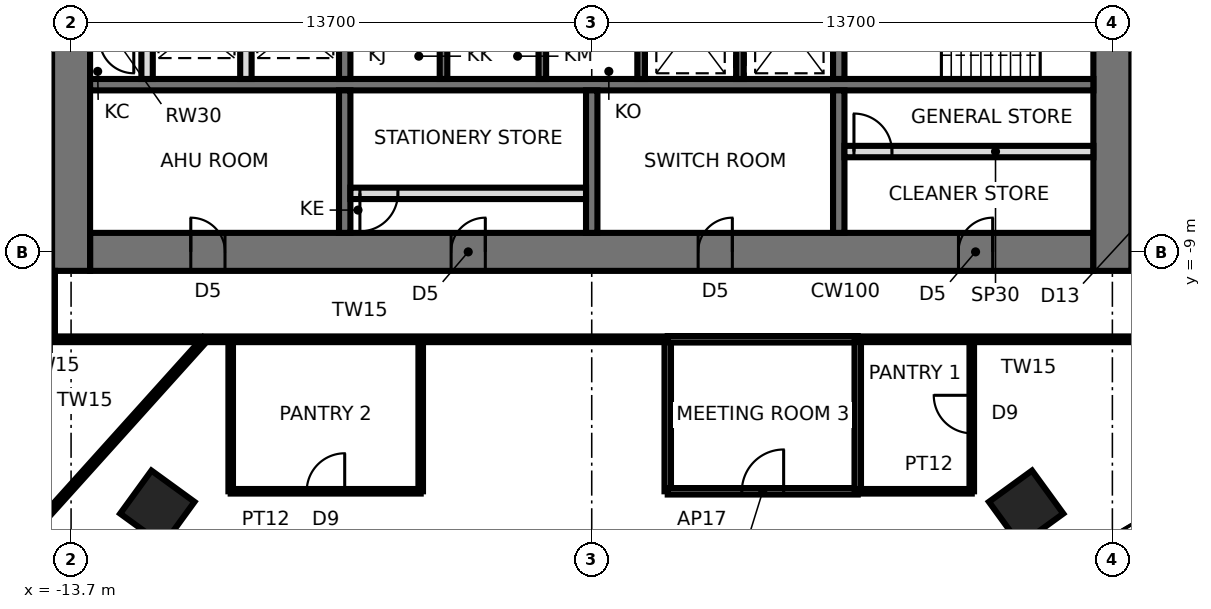
"""IFC4 building model, lengths in metres.
Left out: names, types, materials, properties, quantities, classifications, styles, units other than length and angle.
Written with IfcOpenShell. Run it as: python <this file> out.ifc"""

import sys

from ifc_helpers import new_model, si_unit, direction, frame, frame_2d, origin, origin_2d, place, context, subcontext, project, spatial, rectangle, extrude, element, fill, save


model = new_model("IFC4")
c1 = context("Model", 3, precision=1e-05, world=origin(), true_north=direction((0.0, 1.0)))
c2 = subcontext(c1, "Body", "Model", "MODEL_VIEW")
j1 = project(units=[si_unit("LENGTHUNIT", "METRE"), si_unit("PLANEANGLEUNIT", "RADIAN")], contexts=[c1])
p1 = place(None, origin())
s1 = spatial("IfcSite", under=j1, at=p1, CompositionType="ELEMENT")
p2 = place(p1, origin())
s2 = spatial("IfcBuilding", under=s1, at=p2, CompositionType="ELEMENT")
p3 = place(p2, frame((0.0, 0.0, 211.1)))
s3 = spatial("IfcBuildingStorey", under=s2, at=p3, CompositionType="ELEMENT", Elevation=211.1)
for number, where, z_axis, x_axis in (
    (1, (-11.43, -15.733, 0.0), (0.0, 0.0, 1.0), (-0.588, -0.809, 0.0)),
    (2, (11.43, -15.733, 0.0), (0.0, 0.0, 1.0), (0.588, -0.809, 0.0)),
):
    element("IfcColumn", number, at=place(p3, frame(where, z_axis=z_axis, x_axis=x_axis)), inside=s3, PredefinedType="COLUMN", context=c2, shape_type="SweptSolid", body=[
        extrude(rectangle(XDim=1.4, YDim=1.4, at=origin_2d()), origin(), (0.0, 0.0, 1.0), 3.9),
    ])
p4 = place(p3, frame((-13.2, -9.0, 0.0), z_axis=(0.0, 0.0, 1.0), x_axis=(1.0, 0.0, 0.0)))
e3 = element("IfcWall", 3, at=p4, inside=s3, PredefinedType="SHEAR", context=c2, shape_type="SweptSolid", body=[
    extrude(rectangle(XDim=26.4, YDim=1.0, at=frame_2d((13.2, 0.0))), origin(), (0.0, 0.0, 1.0), 3.9),
])
p5 = place(p4, frame((2.65, 0.0, 0.0)))
e4 = element("IfcOpeningElement", 4, at=p5, cuts=e3, PredefinedType="OPENING", context=c2, shape_type="SweptSolid", body=[
    extrude(rectangle(XDim=0.9, YDim=2.1, at=frame_2d((0.45, 1.05))), frame((0.0, 0.51, 0.0), z_axis=(0.0, -1.0, 0.0), x_axis=(1.0, 0.0, 0.0)), (0.0, 0.0, 1.0), 1.02),
])
p6 = place(p4, frame((9.5, 0.0, 0.0)))
e5 = element("IfcOpeningElement", 5, at=p6, cuts=e3, PredefinedType="OPENING", context=c2, shape_type="SweptSolid", body=[
    extrude(rectangle(XDim=0.9, YDim=2.1, at=frame_2d((0.45, 1.05))), frame((0.0, 0.51, 0.0), z_axis=(0.0, -1.0, 0.0), x_axis=(1.0, 0.0, 0.0)), (0.0, 0.0, 1.0), 1.02),
])
p7 = place(p4, frame((16.0, 0.0, 0.0)))
e6 = element("IfcOpeningElement", 6, at=p7, cuts=e3, PredefinedType="OPENING", context=c2, shape_type="SweptSolid", body=[
    extrude(rectangle(XDim=0.9, YDim=2.1, at=frame_2d((0.45, 1.05))), frame((0.0, 0.51, 0.0), z_axis=(0.0, -1.0, 0.0), x_axis=(1.0, 0.0, 0.0)), (0.0, 0.0, 1.0), 1.02),
])
p8 = place(p4, frame((22.85, 0.0, 0.0)))
e7 = element("IfcOpeningElement", 7, at=p8, cuts=e3, PredefinedType="OPENING", context=c2, shape_type="SweptSolid", body=[
    extrude(rectangle(XDim=0.9, YDim=2.1, at=frame_2d((0.45, 1.05))), frame((0.0, 0.51, 0.0), z_axis=(0.0, -1.0, 0.0), x_axis=(1.0, 0.0, 0.0)), (0.0, 0.0, 1.0), 1.02),
])
p9 = place(p3, frame((13.7, -9.5, 0.0), z_axis=(0.0, 0.0, 1.0), x_axis=(0.0, 1.0, 0.0)))
e8 = element("IfcWall", 8, at=p9, inside=s3, PredefinedType="SHEAR", context=c2, shape_type="SweptSolid", body=[
    extrude(rectangle(XDim=19.0, YDim=1.0, at=frame_2d((9.5, 0.0))), origin(), (0.0, 0.0, 1.0), 3.9),
])
p10 = place(p9, frame((8.6, 0.0, 0.0)))
e9 = element("IfcOpeningElement", 9, at=p10, cuts=e8, PredefinedType="OPENING", context=c2, shape_type="SweptSolid", body=[
    extrude(rectangle(XDim=1.8, YDim=2.4, at=frame_2d((0.9, 1.2))), frame((0.0, 0.51, 0.0), z_axis=(0.0, -1.0, 0.0), x_axis=(1.0, 0.0, 0.0)), (0.0, 0.0, 1.0), 1.02),
])
p11 = place(p3, frame((-13.7, 9.5, 0.0), z_axis=(0.0, 0.0, 1.0), x_axis=(0.0, -1.0, 0.0)))
e10 = element("IfcWall", 10, at=p11, inside=s3, PredefinedType="SHEAR", context=c2, shape_type="SweptSolid", body=[
    extrude(rectangle(XDim=19.0, YDim=1.0, at=frame_2d((9.5, 0.0))), origin(), (0.0, 0.0, 1.0), 3.9),
])
p12 = place(p11, frame((8.6, 0.0, 0.0)))
e11 = element("IfcOpeningElement", 11, at=p12, cuts=e10, PredefinedType="OPENING", context=c2, shape_type="SweptSolid", body=[
    extrude(rectangle(XDim=1.8, YDim=2.4, at=frame_2d((0.9, 1.2))), frame((0.0, 0.51, 0.0), z_axis=(0.0, -1.0, 0.0), x_axis=(1.0, 0.0, 0.0)), (0.0, 0.0, 1.0), 1.02),
])
p13 = place(p3, frame((-13.2, -4.6, 0.0), z_axis=(0.0, 0.0, 1.0), x_axis=(1.0, 0.0, 0.0)))
e12 = element("IfcWall", 12, at=p13, inside=s3, PredefinedType="SHEAR", context=c2, shape_type="SweptSolid", body=[
    extrude(rectangle(XDim=26.4, YDim=0.3, at=frame_2d((13.2, 0.0))), origin(), (0.0, 0.0, 1.0), 3.9),
])
p14 = place(p3, frame((-6.5, -1.75, 0.0), z_axis=(0.0, 0.0, 1.0), x_axis=(0.0, -1.0, 0.0)))
e13 = element("IfcWall", 13, at=p14, inside=s3, PredefinedType="SHEAR", context=c2, shape_type="SweptSolid", body=[
    extrude(rectangle(XDim=2.7, YDim=0.3, at=frame_2d((1.35, 0.0))), origin(), (0.0, 0.0, 1.0), 3.9),
])
p15 = place(p3, frame((-6.5, -4.75, 0.0), z_axis=(0.0, 0.0, 1.0), x_axis=(0.0, -1.0, 0.0)))
e14 = element("IfcWall", 14, at=p15, inside=s3, PredefinedType="SHEAR", context=c2, shape_type="SweptSolid", body=[
    extrude(rectangle(XDim=3.75, YDim=0.3, at=frame_2d((1.875, 0.0))), origin(), (0.0, 0.0, 1.0), 3.9),
])
p16 = place(p3, frame((6.5, -1.75, 0.0), z_axis=(0.0, 0.0, 1.0), x_axis=(0.0, -1.0, 0.0)))
e15 = element("IfcWall", 15, at=p16, inside=s3, PredefinedType="SHEAR", context=c2, shape_type="SweptSolid", body=[
    extrude(rectangle(XDim=2.7, YDim=0.3, at=frame_2d((1.35, 0.0))), origin(), (0.0, 0.0, 1.0), 3.9),
])
p17 = place(p3, frame((6.5, -4.75, 0.0), z_axis=(0.0, 0.0, 1.0), x_axis=(0.0, -1.0, 0.0)))
e16 = element("IfcWall", 16, at=p17, inside=s3, PredefinedType="SHEAR", context=c2, shape_type="SweptSolid", body=[
    extrude(rectangle(XDim=3.75, YDim=0.3, at=frame_2d((1.875, 0.0))), origin(), (0.0, 0.0, 1.0), 3.9),
])
for number, where, z_axis, x_axis in (
    (17, (-3.9, -1.75, 0.0), (0.0, 0.0, 1.0), (0.0, -1.0, 0.0)),
    (18, (-1.3, -1.75, 0.0), (0.0, 0.0, 1.0), (0.0, -1.0, 0.0)),
    (19, (1.3, -1.75, 0.0), (0.0, 0.0, 1.0), (0.0, -1.0, 0.0)),
    (20, (3.9, -1.75, 0.0), (0.0, 0.0, 1.0), (0.0, -1.0, 0.0)),
):
    element("IfcWall", number, at=place(p3, frame(where, z_axis=z_axis, x_axis=x_axis)), inside=s3, PredefinedType="SHEAR", context=c2, shape_type="SweptSolid", body=[
        extrude(rectangle(XDim=2.7, YDim=0.2, at=frame_2d((1.35, 0.0))), origin(), (0.0, 0.0, 1.0), 3.9),
    ])
p18 = place(p3, frame((0.0, -4.75, 0.0), z_axis=(0.0, 0.0, 1.0), x_axis=(0.0, -1.0, 0.0)))
e21 = element("IfcWall", 21, at=p18, inside=s3, PredefinedType="SHEAR", context=c2, shape_type="SweptSolid", body=[
    extrude(rectangle(XDim=3.75, YDim=0.3, at=frame_2d((1.875, 0.0))), origin(), (0.0, 0.0, 1.0), 3.9),
])
p19 = place(p3, frame((-6.35, -7.46, 0.0), z_axis=(0.0, 0.0, 1.0), x_axis=(1.0, 0.0, 0.0)))
e22 = element("IfcWall", 22, at=p19, inside=s3, PredefinedType="PARTITIONING", context=c2, shape_type="SweptSolid", body=[
    extrude(rectangle(XDim=6.2, YDim=0.3, at=frame_2d((3.1, 0.0))), origin(), (0.0, 0.0, 1.0), 3.74),
])
p20 = place(p19, frame((0.25, 0.0, 0.0)))
e23 = element("IfcOpeningElement", 23, at=p20, cuts=e22, PredefinedType="OPENING", context=c2, shape_type="SweptSolid", body=[
    extrude(rectangle(XDim=1.0, YDim=2.4, at=frame_2d((0.5, 1.2))), frame((0.0, 0.16, 0.0), z_axis=(0.0, -1.0, 0.0), x_axis=(1.0, 0.0, 0.0)), (0.0, 0.0, 1.0), 0.32),
])
p21 = place(p3, frame((6.65, -6.36, 0.0), z_axis=(0.0, 0.0, 1.0), x_axis=(1.0, 0.0, 0.0)))
e24 = element("IfcWall", 24, at=p21, inside=s3, PredefinedType="PARTITIONING", context=c2, shape_type="SweptSolid", body=[
    extrude(rectangle(XDim=6.55, YDim=0.3, at=frame_2d((3.275, 0.0))), origin(), (0.0, 0.0, 1.0), 3.74),
])
p22 = place(p21, frame((0.25, 0.0, 0.0)))
e25 = element("IfcOpeningElement", 25, at=p22, cuts=e24, PredefinedType="OPENING", context=c2, shape_type="SweptSolid", body=[
    extrude(rectangle(XDim=1.0, YDim=2.4, at=frame_2d((0.5, 1.2))), frame((0.0, 0.16, 0.0), z_axis=(0.0, -1.0, 0.0), x_axis=(1.0, 0.0, 0.0)), (0.0, 0.0, 1.0), 0.32),
])
for number, where, z_axis, x_axis in (
    (26, (-9.1, -1.75, 0.0), (0.0, 0.0, 1.0), (0.0, -1.0, 0.0)),
    (27, (-11.7, -1.75, 0.0), (0.0, 0.0, 1.0), (0.0, -1.0, 0.0)),
):
    element("IfcWall", number, at=place(p3, frame(where, z_axis=z_axis, x_axis=x_axis)), inside=s3, PredefinedType="SOLIDWALL", context=c2, shape_type="SweptSolid", body=[
        extrude(rectangle(XDim=2.7, YDim=0.3, at=frame_2d((1.35, 0.0))), origin(), (0.0, 0.0, 1.0), 3.74),
    ])
p23 = place(p3, frame((-14.2, -9.5, 0.0), z_axis=(0.0, 0.0, 1.0), x_axis=(0.0, -1.0, 0.0)))
e28 = element("IfcWall", 28, at=p23, inside=s3, PredefinedType="PARTITIONING", context=c2, shape_type="SweptSolid", body=[
    extrude(rectangle(XDim=1.8, YDim=0.15, at=frame_2d((0.9, 0.0))), origin(), (0.0, 0.0, 1.0), 3.74),
])
p24 = place(p3, frame((-14.627, -16.245, 0.0), z_axis=(0.0, 0.0, 1.0), x_axis=(0.669116748293, 0.743157303102, 0.0)))
e29 = element("IfcWall", 29, at=p24, inside=s3, PredefinedType="PARTITIONING", context=c2, shape_type="SweptSolid", body=[
    extrude(rectangle(XDim=6.654, YDim=0.15, at=frame_2d((3.327, 0.0))), origin(), (0.0, 0.0, 1.0), 3.74),
])
p25 = place(p3, frame((-9.5, -11.3, 0.0), z_axis=(0.0, 0.0, 1.0), x_axis=(0.0, -1.0, 0.0)))
e30 = element("IfcWall", 30, at=p25, inside=s3, PredefinedType="PARTITIONING", context=c2, shape_type="SweptSolid", body=[
    extrude(rectangle(XDim=4.0, YDim=0.12, at=frame_2d((2.0, 0.0))), origin(), (0.0, 0.0, 1.0), 3.74),
])
p26 = place(p3, frame((-14.2, -11.3, 0.0), z_axis=(0.0, 0.0, 1.0), x_axis=(1.0, 0.0, 0.0)))
e31 = element("IfcWall", 31, at=p26, inside=s3, PredefinedType="PARTITIONING", context=c2, shape_type="SweptSolid", body=[
    extrude(rectangle(XDim=16.2, YDim=0.15, at=frame_2d((8.1, 0.0))), origin(), (0.0, 0.0, 1.0), 3.74),
])
p27 = place(p3, frame((-9.5, -15.3, 0.0), z_axis=(0.0, 0.0, 1.0), x_axis=(1.0, 0.0, 0.0)))
e32 = element("IfcWall", 32, at=p27, inside=s3, PredefinedType="PARTITIONING", context=c2, shape_type="SweptSolid", body=[
    extrude(rectangle(XDim=5.0, YDim=0.12, at=frame_2d((2.5, 0.0))), origin(), (0.0, 0.0, 1.0), 3.334),
])
p28 = place(p27, frame((2.0, 0.0, 0.0)))
e33 = element("IfcOpeningElement", 33, at=p28, cuts=e32, PredefinedType="OPENING", context=c2, shape_type="SweptSolid", body=[
    extrude(rectangle(XDim=1.0, YDim=2.4, at=frame_2d((0.5, 1.2))), frame((0.0, 0.07, 0.0), z_axis=(0.0, -1.0, 0.0), x_axis=(1.0, 0.0, 0.0)), (0.0, 0.0, 1.0), 0.14),
])
p29 = place(p3, frame((-4.5, -15.3, 0.0), z_axis=(0.0, 0.0, 1.0), x_axis=(0.0, 1.0, 0.0)))
e34 = element("IfcWall", 34, at=p29, inside=s3, PredefinedType="PARTITIONING", context=c2, shape_type="SweptSolid", body=[
    extrude(rectangle(XDim=4.0, YDim=0.12, at=frame_2d((2.0, 0.0))), origin(), (0.0, 0.0, 1.0), 3.74),
])
p30 = place(p3, frame((2.0, -11.3, 0.0), z_axis=(0.0, 0.0, 1.0), x_axis=(0.0, -1.0, 0.0)))
e35 = element("IfcWall", 35, at=p30, inside=s3, PredefinedType="PARTITIONING", context=c2, shape_type="SweptSolid", body=[
    extrude(rectangle(XDim=4.0, YDim=0.17, at=frame_2d((2.0, 0.0))), origin(), (0.0, 0.0, 1.0), 3.74),
])
p31 = place(p3, frame((2.0, -15.3, 0.0), z_axis=(0.0, 0.0, 1.0), x_axis=(1.0, 0.0, 0.0)))
e36 = element("IfcWall", 36, at=p31, inside=s3, PredefinedType="PARTITIONING", context=c2, shape_type="SweptSolid", body=[
    extrude(rectangle(XDim=5.0, YDim=0.17, at=frame_2d((2.5, 0.0))), origin(), (0.0, 0.0, 1.0), 3.334),
])
p32 = place(p31, frame((1.95, 0.0, 0.0)))
e37 = element("IfcOpeningElement", 37, at=p32, cuts=e36, PredefinedType="OPENING", context=c2, shape_type="SweptSolid", body=[
    extrude(rectangle(XDim=1.1, YDim=2.4, at=frame_2d((0.55, 1.2))), frame((0.0, 0.095, 0.0), z_axis=(0.0, -1.0, 0.0), x_axis=(1.0, 0.0, 0.0)), (0.0, 0.0, 1.0), 0.19),
])
p33 = place(p3, frame((7.0, -11.3, 0.0), z_axis=(0.0, 0.0, 1.0), x_axis=(-1.0, 0.0, 0.0)))
e38 = element("IfcWall", 38, at=p33, inside=s3, PredefinedType="PARTITIONING", context=c2, shape_type="SweptSolid", body=[
    extrude(rectangle(XDim=5.0, YDim=0.17, at=frame_2d((2.5, 0.0))), origin(), (0.0, 0.0, 1.0), 3.74),
])
p34 = place(p3, frame((7.0, -11.3, 0.0), z_axis=(0.0, 0.0, 1.0), x_axis=(0.0, -1.0, 0.0)))
e39 = element("IfcWall", 39, at=p34, inside=s3, PredefinedType="PARTITIONING", context=c2, shape_type="SweptSolid", body=[
    extrude(rectangle(XDim=4.0, YDim=0.17, at=frame_2d((2.0, 0.0))), origin(), (0.0, 0.0, 1.0), 3.74),
])
p35 = place(p3, frame((7.0, -15.3, 0.0), z_axis=(0.0, 0.0, 1.0), x_axis=(1.0, 0.0, 0.0)))
e40 = element("IfcWall", 40, at=p35, inside=s3, PredefinedType="PARTITIONING", context=c2, shape_type="SweptSolid", body=[
    extrude(rectangle(XDim=3.0, YDim=0.12, at=frame_2d((1.5, 0.0))), origin(), (0.0, 0.0, 1.0), 3.74),
])
p36 = place(p3, frame((10.0, -15.3, 0.0), z_axis=(0.0, 0.0, 1.0), x_axis=(0.0, 1.0, 0.0)))
e41 = element("IfcWall", 41, at=p36, inside=s3, PredefinedType="PARTITIONING", context=c2, shape_type="SweptSolid", body=[
    extrude(rectangle(XDim=4.0, YDim=0.12, at=frame_2d((2.0, 0.0))), origin(), (0.0, 0.0, 1.0), 3.74),
])
p37 = place(p36, frame((1.526, 0.0, 0.0)))
e42 = element("IfcOpeningElement", 42, at=p37, cuts=e41, PredefinedType="OPENING", context=c2, shape_type="SweptSolid", body=[
    extrude(rectangle(XDim=1.0, YDim=2.4, at=frame_2d((0.5, 1.2))), frame((0.0, 0.07, 0.0), z_axis=(0.0, -1.0, 0.0), x_axis=(1.0, 0.0, 0.0)), (0.0, 0.0, 1.0), 0.14),
])
p38 = place(p3, frame((7.0, -11.3, 0.0), z_axis=(0.0, 0.0, 1.0), x_axis=(1.0, 0.0, 0.0)))
e43 = element("IfcWall", 43, at=p38, inside=s3, PredefinedType="PARTITIONING", context=c2, shape_type="SweptSolid", body=[
    extrude(rectangle(XDim=9.0, YDim=0.15, at=frame_2d((4.5, 0.0))), origin(), (0.0, 0.0, 1.0), 3.74),
])
p39 = place(p5, origin())
e44 = element("IfcDoor", 44, at=p39, inside=s3, OperationType="SINGLE_SWING_LEFT", PredefinedType="DOOR", context=c2, shape_type="SweptSolid", body=[
    extrude(rectangle(XDim=0.82, YDim=2.06, at=frame_2d((0.45, 1.03))), frame((0.0, 0.025, 0.0), z_axis=(0.0, -1.0, 0.0), x_axis=(1.0, 0.0, 0.0)), (0.0, 0.0, 1.0), 0.05),
    extrude(rectangle(XDim=0.04, YDim=2.1, at=frame_2d((0.02, 1.05))), frame((0.0, 0.25, 0.0), z_axis=(0.0, -1.0, 0.0), x_axis=(1.0, 0.0, 0.0)), (0.0, 0.0, 1.0), 0.5),
    extrude(rectangle(XDim=0.04, YDim=2.1, at=frame_2d((0.88, 1.05))), frame((0.0, 0.25, 0.0), z_axis=(0.0, -1.0, 0.0), x_axis=(1.0, 0.0, 0.0)), (0.0, 0.0, 1.0), 0.5),
    extrude(rectangle(XDim=0.82, YDim=0.04, at=frame_2d((0.45, 2.08))), frame((0.0, 0.25, 0.0), z_axis=(0.0, -1.0, 0.0), x_axis=(1.0, 0.0, 0.0)), (0.0, 0.0, 1.0), 0.5),
])
fill(e4, e44)
p40 = place(p6, origin())
e45 = element("IfcDoor", 45, at=p40, inside=s3, OperationType="SINGLE_SWING_RIGHT", PredefinedType="DOOR", context=c2, shape_type="SweptSolid", body=[
    extrude(rectangle(XDim=0.82, YDim=2.06, at=frame_2d((0.45, 1.03))), frame((0.0, 0.025, 0.0), z_axis=(0.0, -1.0, 0.0), x_axis=(1.0, 0.0, 0.0)), (0.0, 0.0, 1.0), 0.05),
    extrude(rectangle(XDim=0.04, YDim=2.1, at=frame_2d((0.02, 1.05))), frame((0.0, 0.25, 0.0), z_axis=(0.0, -1.0, 0.0), x_axis=(1.0, 0.0, 0.0)), (0.0, 0.0, 1.0), 0.5),
    extrude(rectangle(XDim=0.04, YDim=2.1, at=frame_2d((0.88, 1.05))), frame((0.0, 0.25, 0.0), z_axis=(0.0, -1.0, 0.0), x_axis=(1.0, 0.0, 0.0)), (0.0, 0.0, 1.0), 0.5),
    extrude(rectangle(XDim=0.82, YDim=0.04, at=frame_2d((0.45, 2.08))), frame((0.0, 0.25, 0.0), z_axis=(0.0, -1.0, 0.0), x_axis=(1.0, 0.0, 0.0)), (0.0, 0.0, 1.0), 0.5),
])
fill(e5, e45)
p41 = place(p7, origin())
e46 = element("IfcDoor", 46, at=p41, inside=s3, OperationType="SINGLE_SWING_RIGHT", PredefinedType="DOOR", context=c2, shape_type="SweptSolid", body=[
    extrude(rectangle(XDim=0.82, YDim=2.06, at=frame_2d((0.45, 1.03))), frame((0.0, 0.025, 0.0), z_axis=(0.0, -1.0, 0.0), x_axis=(1.0, 0.0, 0.0)), (0.0, 0.0, 1.0), 0.05),
    extrude(rectangle(XDim=0.04, YDim=2.1, at=frame_2d((0.02, 1.05))), frame((0.0, 0.25, 0.0), z_axis=(0.0, -1.0, 0.0), x_axis=(1.0, 0.0, 0.0)), (0.0, 0.0, 1.0), 0.5),
    extrude(rectangle(XDim=0.04, YDim=2.1, at=frame_2d((0.88, 1.05))), frame((0.0, 0.25, 0.0), z_axis=(0.0, -1.0, 0.0), x_axis=(1.0, 0.0, 0.0)), (0.0, 0.0, 1.0), 0.5),
    extrude(rectangle(XDim=0.82, YDim=0.04, at=frame_2d((0.45, 2.08))), frame((0.0, 0.25, 0.0), z_axis=(0.0, -1.0, 0.0), x_axis=(1.0, 0.0, 0.0)), (0.0, 0.0, 1.0), 0.5),
])
fill(e6, e46)
p42 = place(p8, origin())
e47 = element("IfcDoor", 47, at=p42, inside=s3, OperationType="SINGLE_SWING_RIGHT", PredefinedType="DOOR", context=c2, shape_type="SweptSolid", body=[
    extrude(rectangle(XDim=0.82, YDim=2.06, at=frame_2d((0.45, 1.03))), frame((0.0, 0.025, 0.0), z_axis=(0.0, -1.0, 0.0), x_axis=(1.0, 0.0, 0.0)), (0.0, 0.0, 1.0), 0.05),
    extrude(rectangle(XDim=0.04, YDim=2.1, at=frame_2d((0.02, 1.05))), frame((0.0, 0.25, 0.0), z_axis=(0.0, -1.0, 0.0), x_axis=(1.0, 0.0, 0.0)), (0.0, 0.0, 1.0), 0.5),
    extrude(rectangle(XDim=0.04, YDim=2.1, at=frame_2d((0.88, 1.05))), frame((0.0, 0.25, 0.0), z_axis=(0.0, -1.0, 0.0), x_axis=(1.0, 0.0, 0.0)), (0.0, 0.0, 1.0), 0.5),
    extrude(rectangle(XDim=0.82, YDim=0.04, at=frame_2d((0.45, 2.08))), frame((0.0, 0.25, 0.0), z_axis=(0.0, -1.0, 0.0), x_axis=(1.0, 0.0, 0.0)), (0.0, 0.0, 1.0), 0.5),
])
fill(e7, e47)
p43 = place(p20, frame((1.0, 0.0, 0.0), z_axis=(0.0, 0.0, 1.0), x_axis=(-1.0, 0.0, 0.0)))
e48 = element("IfcDoor", 48, at=p43, inside=s3, OperationType="SINGLE_SWING_RIGHT", PredefinedType="DOOR", context=c2, shape_type="SweptSolid", body=[
    extrude(rectangle(XDim=1.0, YDim=2.4, at=frame_2d((0.5, 1.2))), frame((0.0, 0.025, 0.0), z_axis=(0.0, -1.0, 0.0), x_axis=(1.0, 0.0, 0.0)), (0.0, 0.0, 1.0), 0.05),
])
fill(e23, e48)
p44 = place(p22, origin())
e49 = element("IfcDoor", 49, at=p44, inside=s3, OperationType="SINGLE_SWING_LEFT", PredefinedType="DOOR", context=c2, shape_type="SweptSolid", body=[
    extrude(rectangle(XDim=1.0, YDim=2.4, at=frame_2d((0.5, 1.2))), frame((0.0, 0.025, 0.0), z_axis=(0.0, -1.0, 0.0), x_axis=(1.0, 0.0, 0.0)), (0.0, 0.0, 1.0), 0.05),
])
fill(e25, e49)
p45 = place(p32, origin())
e50 = element("IfcDoor", 50, at=p45, inside=s3, OperationType="SINGLE_SWING_RIGHT", PredefinedType="DOOR", context=c2, shape_type="SweptSolid", body=[
    extrude(rectangle(XDim=1.1, YDim=2.4, at=frame_2d((0.55, 1.2))), frame((0.0, 0.025, 0.0), z_axis=(0.0, -1.0, 0.0), x_axis=(1.0, 0.0, 0.0)), (0.0, 0.0, 1.0), 0.05),
])
fill(e37, e50)
p46 = place(p37, origin())
e51 = element("IfcDoor", 51, at=p46, inside=s3, OperationType="SINGLE_SWING_RIGHT", PredefinedType="DOOR", context=c2, shape_type="SweptSolid", body=[
    extrude(rectangle(XDim=1.0, YDim=2.4, at=frame_2d((0.5, 1.2))), frame((0.0, 0.025, 0.0), z_axis=(0.0, -1.0, 0.0), x_axis=(1.0, 0.0, 0.0)), (0.0, 0.0, 1.0), 0.05),
])
fill(e42, e51)
p47 = place(p28, origin())
e52 = element("IfcDoor", 52, at=p47, inside=s3, OperationType="SINGLE_SWING_RIGHT", PredefinedType="DOOR", context=c2, shape_type="SweptSolid", body=[
    extrude(rectangle(XDim=1.0, YDim=2.4, at=frame_2d((0.5, 1.2))), frame((0.0, 0.025, 0.0), z_axis=(0.0, -1.0, 0.0), x_axis=(1.0, 0.0, 0.0)), (0.0, 0.0, 1.0), 0.05),
])
fill(e33, e52)
save(model, sys.argv[1])
